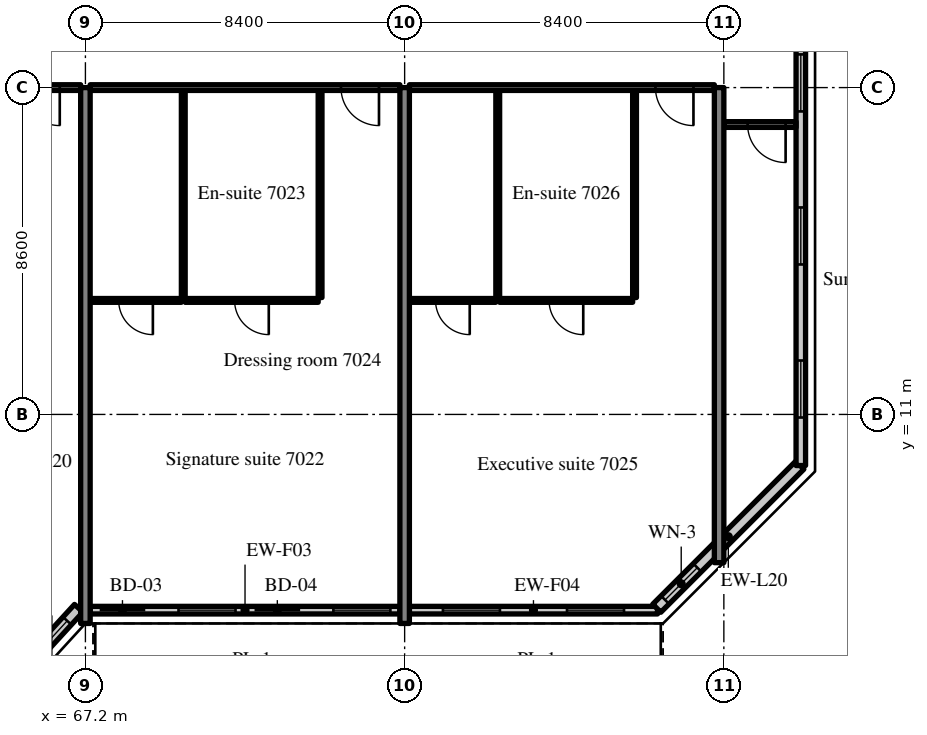
"""IFC4 building model, lengths in metres.
Left out: names, types, materials, properties, quantities, classifications, styles, units other than length and angle.
Written with IfcOpenShell. Run it as: python <this file> out.ifc"""

import sys

from ifc_helpers import new_model, si_unit, direction, frame, frame_2d, origin, place, context, subcontext, project, spatial, rectangle, extrude, source, transform, mapped, element, fill, save


model = new_model("IFC4")
c1 = context("Model", 3, precision=1e-05, world=origin(), true_north=direction((0.0, 1.0)))
c2 = subcontext(c1, "Body", "Model", "MODEL_VIEW")
j1 = project(units=[si_unit("LENGTHUNIT", "METRE"), si_unit("PLANEANGLEUNIT", "RADIAN")], contexts=[c1])
p1 = place(None, origin())
s1 = spatial("IfcSite", under=j1, at=p1, CompositionType="ELEMENT")
p2 = place(p1, origin())
s2 = spatial("IfcBuilding", under=s1, at=p2, CompositionType="ELEMENT")
p3 = place(p2, frame((0.0, 0.0, 293.7)))
s3 = spatial("IfcBuildingStorey", under=s2, at=p3, CompositionType="ELEMENT", Elevation=293.7)
m1 = source(origin(), c2, "Body", "SweptSolid", [
    extrude(rectangle(XDim=14.1, YDim=0.25, at=frame_2d((7.05, 0.0))), origin(), (0.0, 0.0, 1.0), 3.72),
])
for number, where, z_axis, x_axis in (
    (1, (67.2, 5.5, 0.0), (0.0, 0.0, 1.0), (0.0, 1.0, 0.0)),
    (2, (75.6, 5.5, 0.0), (0.0, 0.0, 1.0), (0.0, 1.0, 0.0)),
):
    element("IfcWall", number, at=place(p3, frame(where, z_axis=z_axis, x_axis=x_axis)), inside=s3, PredefinedType="SHEAR", context=c2, shape_type="MappedRepresentation", body=[
        mapped(m1, transform((0.0, 0.0, 0.0), scale=1.0)),
    ])
m2 = source(origin(), c2, "Body", "SweptSolid", [
    extrude(rectangle(XDim=12.5, YDim=0.25, at=frame_2d((6.25, 0.0))), origin(), (0.0, 0.0, 1.0), 3.72),
])
p4 = place(p3, frame((83.875, 7.1, 0.0), z_axis=(0.0, 0.0, 1.0), x_axis=(0.0, 1.0, 0.0)))
e3 = element("IfcWall", 3, at=p4, inside=s3, PredefinedType="SHEAR", context=c2, shape_type="MappedRepresentation", body=[
    mapped(m2, transform((0.0, 0.0, 0.0), scale=1.0)),
])
m3 = source(origin(), c2, "Body", "SweptSolid", [
    extrude(rectangle(XDim=2.398, YDim=0.3, at=frame_2d((1.199, 0.0))), origin(), (0.0, 0.0, 1.0), 3.72),
])
p5 = place(p3, frame((65.404, 4.131, 0.0), z_axis=(0.0, 0.0, 1.0), x_axis=(0.675374189419, 0.737475222815, 0.0)))
e4 = element("IfcWall", 4, at=p5, inside=s3, PredefinedType="SOLIDWALL", context=c2, shape_type="MappedRepresentation", body=[
    mapped(m3, transform((0.0, 0.0, 0.0), scale=1.0)),
])
m4 = source(origin(), c2, "Body", "SweptSolid", [
    extrude(rectangle(XDim=1.5, YDim=2.0, at=frame_2d((0.75, 1.0))), frame((0.0, 0.16, 0.0), z_axis=(0.0, -1.0, 0.0), x_axis=(1.0, 0.0, 0.0)), (0.0, 0.0, 1.0), 0.32),
])
p6 = place(p5, frame((0.449, 0.0, 0.9)))
e5 = element("IfcOpeningElement", 5, at=p6, cuts=e4, PredefinedType="OPENING", context=c2, shape_type="MappedRepresentation", body=[
    mapped(m4, transform((0.0, 0.0, 0.0), scale=1.0)),
])
m5 = source(origin(), c2, "Body", "SweptSolid", [
    extrude(rectangle(XDim=8.15, YDim=0.2, at=frame_2d((4.075, 0.0))), origin(), (0.0, 0.0, 1.0), 3.17),
])
p7 = place(p3, frame((67.325, 5.85, 0.0), z_axis=(0.0, 0.0, 1.0), x_axis=(1.0, 0.0, 0.0)))
e6 = element("IfcWall", 6, at=p7, inside=s3, PredefinedType="SOLIDWALL", context=c2, shape_type="MappedRepresentation", body=[
    mapped(m5, transform((0.0, 0.0, 0.0), scale=1.0)),
])
m6 = source(origin(), c2, "Body", "SweptSolid", [
    extrude(rectangle(XDim=1.2, YDim=2.4, at=frame_2d((0.6, 1.2))), frame((0.0, 0.11, 0.0), z_axis=(0.0, -1.0, 0.0), x_axis=(1.0, 0.0, 0.0)), (0.0, 0.0, 1.0), 0.22),
])
p8 = place(p7, frame((0.25, 0.0, 0.0)))
e7 = element("IfcOpeningElement", 7, at=p8, cuts=e6, PredefinedType="OPENING", context=c2, shape_type="MappedRepresentation", body=[
    mapped(m6, transform((0.0, 0.0, 0.0), scale=1.0)),
])
m7 = source(origin(), c2, "Body", "SweptSolid", [
    extrude(rectangle(XDim=1.5, YDim=1.5, at=frame_2d((0.75, 0.75))), frame((0.0, 0.11, 0.0), z_axis=(0.0, -1.0, 0.0), x_axis=(1.0, 0.0, 0.0)), (0.0, 0.0, 1.0), 0.22),
])
p9 = place(p7, frame((2.325, 0.0, 0.9)))
e8 = element("IfcOpeningElement", 8, at=p9, cuts=e6, PredefinedType="OPENING", context=c2, shape_type="MappedRepresentation", body=[
    mapped(m7, transform((0.0, 0.0, 0.0), scale=1.0)),
])
p10 = place(p7, frame((4.325, 0.0, 0.0)))
e9 = element("IfcOpeningElement", 9, at=p10, cuts=e6, PredefinedType="OPENING", context=c2, shape_type="MappedRepresentation", body=[
    mapped(m6, transform((0.0, 0.0, 0.0), scale=1.0)),
])
p11 = place(p7, frame((6.4, 0.0, 0.9)))
e10 = element("IfcOpeningElement", 10, at=p11, cuts=e6, PredefinedType="OPENING", context=c2, shape_type="MappedRepresentation", body=[
    mapped(m7, transform((0.0, 0.0, 0.0), scale=1.0)),
])
m8 = source(origin(), c2, "Body", "SweptSolid", [
    extrude(rectangle(XDim=6.53, YDim=0.2, at=frame_2d((3.265, 0.0))), origin(), (0.0, 0.0, 1.0), 3.17),
])
p12 = place(p3, frame((75.725, 5.85, 0.0), z_axis=(0.0, 0.0, 1.0), x_axis=(1.0, 0.0, 0.0)))
e11 = element("IfcWall", 11, at=p12, inside=s3, PredefinedType="SOLIDWALL", context=c2, shape_type="MappedRepresentation", body=[
    mapped(m8, transform((0.0, 0.0, 0.0), scale=1.0)),
])
p13 = place(p12, frame((0.883, 0.0, 0.9)))
e12 = element("IfcOpeningElement", 12, at=p13, cuts=e11, PredefinedType="OPENING", context=c2, shape_type="MappedRepresentation", body=[
    mapped(m7, transform((0.0, 0.0, 0.0), scale=1.0)),
])
p14 = place(p12, frame((4.147, 0.0, 0.9)))
e13 = element("IfcOpeningElement", 13, at=p14, cuts=e11, PredefinedType="OPENING", context=c2, shape_type="MappedRepresentation", body=[
    mapped(m7, transform((0.0, 0.0, 0.0), scale=1.0)),
])
m9 = source(origin(), c2, "Body", "SweptSolid", [
    extrude(rectangle(XDim=5.326, YDim=0.3, at=frame_2d((2.663, 0.0))), origin(), (0.0, 0.0, 1.0), 3.72),
])
p15 = place(p3, frame((82.234, 5.9, 0.0), z_axis=(0.0, 0.0, 1.0), x_axis=(0.707083859269, 0.707129702361, 0.0)))
e14 = element("IfcWall", 14, at=p15, inside=s3, PredefinedType="SOLIDWALL", context=c2, shape_type="MappedRepresentation", body=[
    mapped(m9, transform((0.0, 0.0, 0.0), scale=1.0)),
])
m10 = source(origin(), c2, "Body", "SweptSolid", [
    extrude(rectangle(XDim=1.2, YDim=1.5, at=frame_2d((0.6, 0.75))), frame((0.0, 0.16, 0.0), z_axis=(0.0, -1.0, 0.0), x_axis=(1.0, 0.0, 0.0)), (0.0, 0.0, 1.0), 0.32),
])
p16 = place(p15, frame((0.31, 0.0, 0.9)))
e15 = element("IfcOpeningElement", 15, at=p16, cuts=e14, PredefinedType="OPENING", context=c2, shape_type="MappedRepresentation", body=[
    mapped(m10, transform((0.0, 0.0, 0.0), scale=1.0)),
])
m11 = source(origin(), c2, "Body", "SweptSolid", [
    extrude(rectangle(XDim=28.189, YDim=0.25, at=frame_2d((14.095, 0.0))), origin(), (0.0, 0.0, 1.0), 3.72),
])
p17 = place(p3, frame((86.025, 9.655, 0.0), z_axis=(0.0, 0.0, 1.0), x_axis=(0.0, 1.0, 0.0)))
e16 = element("IfcWall", 16, at=p17, inside=s3, PredefinedType="SOLIDWALL", context=c2, shape_type="MappedRepresentation", body=[
    mapped(m11, transform((0.0, 0.0, 0.0), scale=1.0)),
])
m12 = source(origin(), c2, "Body", "SweptSolid", [
    extrude(rectangle(XDim=1.5, YDim=1.5, at=frame_2d((0.75, 0.75))), frame((0.0, 0.135, 0.0), z_axis=(0.0, -1.0, 0.0), x_axis=(1.0, 0.0, 0.0)), (0.0, 0.0, 1.0), 0.27),
])
p18 = place(p17, frame((1.263, 0.0, 0.9)))
e17 = element("IfcOpeningElement", 17, at=p18, cuts=e16, PredefinedType="OPENING", context=c2, shape_type="MappedRepresentation", body=[
    mapped(m12, transform((0.0, 0.0, 0.0), scale=1.0)),
])
p19 = place(p17, frame((5.291, 0.0, 0.9)))
e18 = element("IfcOpeningElement", 18, at=p19, cuts=e16, PredefinedType="OPENING", context=c2, shape_type="MappedRepresentation", body=[
    mapped(m12, transform((0.0, 0.0, 0.0), scale=1.0)),
])
p20 = place(p17, frame((9.318, 0.0, 0.9)))
e19 = element("IfcOpeningElement", 19, at=p20, cuts=e16, PredefinedType="OPENING", context=c2, shape_type="MappedRepresentation", body=[
    mapped(m12, transform((0.0, 0.0, 0.0), scale=1.0)),
])
p21 = place(p17, frame((13.345, 0.0, 0.9)))
e20 = element("IfcOpeningElement", 20, at=p21, cuts=e16, PredefinedType="OPENING", context=c2, shape_type="MappedRepresentation", body=[
    mapped(m12, transform((0.0, 0.0, 0.0), scale=1.0)),
])
p22 = place(p17, frame((17.372, 0.0, 0.9)))
e21 = element("IfcOpeningElement", 21, at=p22, cuts=e16, PredefinedType="OPENING", context=c2, shape_type="MappedRepresentation", body=[
    mapped(m12, transform((0.0, 0.0, 0.0), scale=1.0)),
])
p23 = place(p17, frame((21.399, 0.0, 0.9)))
e22 = element("IfcOpeningElement", 22, at=p23, cuts=e16, PredefinedType="OPENING", context=c2, shape_type="MappedRepresentation", body=[
    mapped(m12, transform((0.0, 0.0, 0.0), scale=1.0)),
])
p24 = place(p17, frame((25.426, 0.0, 0.9)))
e23 = element("IfcOpeningElement", 23, at=p24, cuts=e16, PredefinedType="OPENING", context=c2, shape_type="MappedRepresentation", body=[
    mapped(m12, transform((0.0, 0.0, 0.0), scale=1.0)),
])
m13 = source(origin(), c2, "Body", "SweptSolid", [
    extrude(rectangle(XDim=4.0, YDim=0.15, at=frame_2d((2.0, 0.0))), origin(), (0.0, 0.0, 1.0), 3.02),
])
p25 = place(p3, frame((63.075, 19.6, 0.0), z_axis=(0.0, 0.0, 1.0), x_axis=(1.0, 0.0, 0.0)))
e24 = element("IfcWall", 24, at=p25, inside=s3, PredefinedType="PARTITIONING", context=c2, shape_type="MappedRepresentation", body=[
    mapped(m13, transform((0.0, 0.0, 0.0), scale=1.0)),
])
m14 = source(origin(), c2, "Body", "SweptSolid", [
    extrude(rectangle(XDim=1.0, YDim=2.1, at=frame_2d((0.5, 1.05))), frame((0.0, 0.085, 0.0), z_axis=(0.0, -1.0, 0.0), x_axis=(1.0, 0.0, 0.0)), (0.0, 0.0, 1.0), 0.17),
])
p26 = place(p25, frame((2.45, 0.0, 0.0)))
e25 = element("IfcOpeningElement", 25, at=p26, cuts=e24, PredefinedType="OPENING", context=c2, shape_type="MappedRepresentation", body=[
    mapped(m14, transform((0.0, 0.0, 0.0), scale=1.0)),
])
m15 = source(origin(), c2, "Body", "SweptSolid", [
    extrude(rectangle(XDim=5.45, YDim=0.1, at=frame_2d((2.725, 0.0))), origin(), (0.0, 0.0, 1.0), 3.72),
])
for number, where, z_axis, x_axis in (
    (26, (73.375, 14.075, 0.0), (0.0, 0.0, 1.0), (0.0, 1.0, 0.0)),
    (27, (69.775, 14.075, 0.0), (0.0, 0.0, 1.0), (0.0, 1.0, 0.0)),
):
    element("IfcWall", number, at=place(p3, frame(where, z_axis=z_axis, x_axis=x_axis)), inside=s3, PredefinedType="PARTITIONING", context=c2, shape_type="MappedRepresentation", body=[
        mapped(m15, transform((0.0, 0.0, 0.0), scale=1.0)),
    ])
m16 = source(origin(), c2, "Body", "SweptSolid", [
    extrude(rectangle(XDim=3.5, YDim=0.1, at=frame_2d((1.75, 0.0))), origin(), (0.0, 0.0, 1.0), 3.72),
])
p27 = place(p3, frame((69.825, 14.0, 0.0), z_axis=(0.0, 0.0, 1.0), x_axis=(1.0, 0.0, 0.0)))
e28 = element("IfcWall", 28, at=p27, inside=s3, PredefinedType="PARTITIONING", context=c2, shape_type="MappedRepresentation", body=[
    mapped(m16, transform((0.0, 0.0, 0.0), scale=1.0)),
])
m17 = source(origin(), c2, "Body", "SweptSolid", [
    extrude(rectangle(XDim=0.9, YDim=2.1, at=frame_2d((0.45, 1.05))), frame((0.0, 0.06, 0.0), z_axis=(0.0, -1.0, 0.0), x_axis=(1.0, 0.0, 0.0)), (0.0, 0.0, 1.0), 0.12),
])
p28 = place(p27, frame((1.3, 0.0, 0.0)))
e29 = element("IfcOpeningElement", 29, at=p28, cuts=e28, PredefinedType="OPENING", context=c2, shape_type="MappedRepresentation", body=[
    mapped(m17, transform((0.0, 0.0, 0.0), scale=1.0)),
])
m18 = source(origin(), c2, "Body", "SweptSolid", [
    extrude(rectangle(XDim=2.4, YDim=0.1, at=frame_2d((1.2, 0.0))), origin(), (0.0, 0.0, 1.0), 3.72),
])
p29 = place(p3, frame((67.325, 14.0, 0.0), z_axis=(0.0, 0.0, 1.0), x_axis=(1.0, 0.0, 0.0)))
e30 = element("IfcWall", 30, at=p29, inside=s3, PredefinedType="PARTITIONING", context=c2, shape_type="MappedRepresentation", body=[
    mapped(m18, transform((0.0, 0.0, 0.0), scale=1.0)),
])
p30 = place(p29, frame((0.75, 0.0, 0.0)))
e31 = element("IfcOpeningElement", 31, at=p30, cuts=e30, PredefinedType="OPENING", context=c2, shape_type="MappedRepresentation", body=[
    mapped(m17, transform((0.0, 0.0, 0.0), scale=1.0)),
])
m19 = source(origin(), c2, "Body", "SweptSolid", [
    extrude(rectangle(XDim=8.15, YDim=0.15, at=frame_2d((4.075, 0.0))), origin(), (0.0, 0.0, 1.0), 3.02),
])
p31 = place(p3, frame((67.325, 19.6, 0.0), z_axis=(0.0, 0.0, 1.0), x_axis=(1.0, 0.0, 0.0)))
e32 = element("IfcWall", 32, at=p31, inside=s3, PredefinedType="PARTITIONING", context=c2, shape_type="MappedRepresentation", body=[
    mapped(m19, transform((0.0, 0.0, 0.0), scale=1.0)),
])
p32 = place(p31, frame((6.6, 0.0, 0.0)))
e33 = element("IfcOpeningElement", 33, at=p32, cuts=e32, PredefinedType="OPENING", context=c2, shape_type="MappedRepresentation", body=[
    mapped(m14, transform((0.0, 0.0, 0.0), scale=1.0)),
])
for number, where, z_axis, x_axis in (
    (34, (81.65, 14.075, 0.0), (0.0, 0.0, 1.0), (0.0, 1.0, 0.0)),
    (35, (78.05, 14.075, 0.0), (0.0, 0.0, 1.0), (0.0, 1.0, 0.0)),
):
    element("IfcWall", number, at=place(p3, frame(where, z_axis=z_axis, x_axis=x_axis)), inside=s3, PredefinedType="PARTITIONING", context=c2, shape_type="MappedRepresentation", body=[
        mapped(m15, transform((0.0, 0.0, 0.0), scale=1.0)),
    ])
p33 = place(p3, frame((78.1, 14.0, 0.0), z_axis=(0.0, 0.0, 1.0), x_axis=(1.0, 0.0, 0.0)))
e36 = element("IfcWall", 36, at=p33, inside=s3, PredefinedType="PARTITIONING", context=c2, shape_type="MappedRepresentation", body=[
    mapped(m16, transform((0.0, 0.0, 0.0), scale=1.0)),
])
p34 = place(p33, frame((1.3, 0.0, 0.0)))
e37 = element("IfcOpeningElement", 37, at=p34, cuts=e36, PredefinedType="OPENING", context=c2, shape_type="MappedRepresentation", body=[
    mapped(m17, transform((0.0, 0.0, 0.0), scale=1.0)),
])
m20 = source(origin(), c2, "Body", "SweptSolid", [
    extrude(rectangle(XDim=2.275, YDim=0.1, at=frame_2d((1.137, 0.0))), origin(), (0.0, 0.0, 1.0), 3.72),
])
p35 = place(p3, frame((75.725, 14.0, 0.0), z_axis=(0.0, 0.0, 1.0), x_axis=(1.0, 0.0, 0.0)))
e38 = element("IfcWall", 38, at=p35, inside=s3, PredefinedType="PARTITIONING", context=c2, shape_type="MappedRepresentation", body=[
    mapped(m20, transform((0.0, 0.0, 0.0), scale=1.0)),
])
p36 = place(p35, frame((0.688, 0.0, 0.0)))
e39 = element("IfcOpeningElement", 39, at=p36, cuts=e38, PredefinedType="OPENING", context=c2, shape_type="MappedRepresentation", body=[
    mapped(m17, transform((0.0, 0.0, 0.0), scale=1.0)),
])
m21 = source(origin(), c2, "Body", "SweptSolid", [
    extrude(rectangle(XDim=8.025, YDim=0.15, at=frame_2d((4.012, 0.0))), origin(), (0.0, 0.0, 1.0), 3.02),
])
p37 = place(p3, frame((75.725, 19.6, 0.0), z_axis=(0.0, 0.0, 1.0), x_axis=(1.0, 0.0, 0.0)))
e40 = element("IfcWall", 40, at=p37, inside=s3, PredefinedType="PARTITIONING", context=c2, shape_type="MappedRepresentation", body=[
    mapped(m21, transform((0.0, 0.0, 0.0), scale=1.0)),
])
p38 = place(p37, frame((6.475, 0.0, 0.0)))
e41 = element("IfcOpeningElement", 41, at=p38, cuts=e40, PredefinedType="OPENING", context=c2, shape_type="MappedRepresentation", body=[
    mapped(m14, transform((0.0, 0.0, 0.0), scale=1.0)),
])
m22 = source(origin(), c2, "Body", "SweptSolid", [
    extrude(rectangle(XDim=1.9, YDim=0.15, at=frame_2d((0.95, 0.0))), origin(), (0.0, 0.0, 1.0), 3.02),
])
p39 = place(p3, frame((84.0, 18.628, 0.0), z_axis=(0.0, 0.0, 1.0), x_axis=(1.0, 0.0, 0.0)))
e42 = element("IfcWall", 42, at=p39, inside=s3, PredefinedType="PARTITIONING", context=c2, shape_type="MappedRepresentation", body=[
    mapped(m22, transform((0.0, 0.0, 0.0), scale=1.0)),
])
p40 = place(p39, frame((0.625, 0.0, 0.0)))
e43 = element("IfcOpeningElement", 43, at=p40, cuts=e42, PredefinedType="OPENING", context=c2, shape_type="MappedRepresentation", body=[
    mapped(m14, transform((0.0, 0.0, 0.0), scale=1.0)),
])
m23 = source(origin(), c2, "Body", "SweptSolid", [
    extrude(rectangle(XDim=1.5, YDim=2.0, at=frame_2d((0.75, 1.0))), frame((0.0, 0.03, 0.0), z_axis=(0.0, -1.0, 0.0), x_axis=(1.0, 0.0, 0.0)), (0.0, 0.0, 1.0), 0.06),
])
p41 = place(p6, origin())
e44 = element("IfcWindow", 44, at=p41, inside=s3, PartitioningType="SINGLE_PANEL", PredefinedType="WINDOW", context=c2, shape_type="MappedRepresentation", body=[
    mapped(m23, transform((0.0, 0.0, 0.0), scale=1.0)),
])
fill(e5, e44)
m24 = source(origin(), c2, "Body", "SweptSolid", [
    extrude(rectangle(XDim=1.2, YDim=2.4, at=frame_2d((0.6, 1.2))), frame((0.0, 0.025, 0.0), z_axis=(0.0, -1.0, 0.0), x_axis=(1.0, 0.0, 0.0)), (0.0, 0.0, 1.0), 0.05),
])
p42 = place(p8, origin())
e45 = element("IfcDoor", 45, at=p42, inside=s3, OperationType="SLIDING_TO_LEFT", PredefinedType="DOOR", context=c2, shape_type="MappedRepresentation", body=[
    mapped(m24, transform((0.0, 0.0, 0.0), scale=1.0)),
])
fill(e7, e45)
m25 = source(origin(), c2, "Body", "SweptSolid", [
    extrude(rectangle(XDim=1.5, YDim=1.5, at=frame_2d((0.75, 0.75))), frame((0.0, 0.03, 0.0), z_axis=(0.0, -1.0, 0.0), x_axis=(1.0, 0.0, 0.0)), (0.0, 0.0, 1.0), 0.06),
])
p43 = place(p9, origin())
e46 = element("IfcWindow", 46, at=p43, inside=s3, PartitioningType="SINGLE_PANEL", PredefinedType="WINDOW", context=c2, shape_type="MappedRepresentation", body=[
    mapped(m25, transform((0.0, 0.0, 0.0), scale=1.0)),
])
fill(e8, e46)
p44 = place(p10, origin())
e47 = element("IfcDoor", 47, at=p44, inside=s3, OperationType="SLIDING_TO_RIGHT", PredefinedType="DOOR", context=c2, shape_type="MappedRepresentation", body=[
    mapped(m24, transform((0.0, 0.0, 0.0), scale=1.0)),
])
fill(e9, e47)
p45 = place(p11, origin())
e48 = element("IfcWindow", 48, at=p45, inside=s3, PartitioningType="SINGLE_PANEL", PredefinedType="WINDOW", context=c2, shape_type="MappedRepresentation", body=[
    mapped(m25, transform((0.0, 0.0, 0.0), scale=1.0)),
])
fill(e10, e48)
p46 = place(p13, origin())
e49 = element("IfcWindow", 49, at=p46, inside=s3, PartitioningType="SINGLE_PANEL", PredefinedType="WINDOW", context=c2, shape_type="MappedRepresentation", body=[
    mapped(m25, transform((0.0, 0.0, 0.0), scale=1.0)),
])
fill(e12, e49)
p47 = place(p14, origin())
e50 = element("IfcWindow", 50, at=p47, inside=s3, PartitioningType="SINGLE_PANEL", PredefinedType="WINDOW", context=c2, shape_type="MappedRepresentation", body=[
    mapped(m25, transform((0.0, 0.0, 0.0), scale=1.0)),
])
fill(e13, e50)
m26 = source(origin(), c2, "Body", "SweptSolid", [
    extrude(rectangle(XDim=1.2, YDim=1.5, at=frame_2d((0.6, 0.75))), frame((0.0, 0.03, 0.0), z_axis=(0.0, -1.0, 0.0), x_axis=(1.0, 0.0, 0.0)), (0.0, 0.0, 1.0), 0.06),
])
p48 = place(p16, origin())
e51 = element("IfcWindow", 51, at=p48, inside=s3, PartitioningType="SINGLE_PANEL", PredefinedType="WINDOW", context=c2, shape_type="MappedRepresentation", body=[
    mapped(m26, transform((0.0, 0.0, 0.0), scale=1.0)),
])
fill(e15, e51)
p49 = place(p18, origin())
e52 = element("IfcWindow", 52, at=p49, inside=s3, PartitioningType="SINGLE_PANEL", PredefinedType="WINDOW", context=c2, shape_type="MappedRepresentation", body=[
    mapped(m25, transform((0.0, 0.0, 0.0), scale=1.0)),
])
fill(e17, e52)
p50 = place(p19, origin())
e53 = element("IfcWindow", 53, at=p50, inside=s3, PartitioningType="SINGLE_PANEL", PredefinedType="WINDOW", context=c2, shape_type="MappedRepresentation", body=[
    mapped(m25, transform((0.0, 0.0, 0.0), scale=1.0)),
])
fill(e18, e53)
p51 = place(p20, origin())
e54 = element("IfcWindow", 54, at=p51, inside=s3, PartitioningType="SINGLE_PANEL", PredefinedType="WINDOW", context=c2, shape_type="MappedRepresentation", body=[
    mapped(m25, transform((0.0, 0.0, 0.0), scale=1.0)),
])
fill(e19, e54)
m27 = source(origin(), c2, "Body", "SweptSolid", [
    extrude(rectangle(XDim=1.0, YDim=2.1, at=frame_2d((0.5, 1.05))), frame((0.0, 0.025, 0.0), z_axis=(0.0, -1.0, 0.0), x_axis=(1.0, 0.0, 0.0)), (0.0, 0.0, 1.0), 0.05),
])
p52 = place(p26, origin())
e55 = element("IfcDoor", 55, at=p52, inside=s3, OperationType="SINGLE_SWING_RIGHT", PredefinedType="DOOR", context=c2, shape_type="MappedRepresentation", body=[
    mapped(m27, transform((0.0, 0.0, 0.0), scale=1.0)),
])
fill(e25, e55)
m28 = source(origin(), c2, "Body", "SweptSolid", [
    extrude(rectangle(XDim=0.9, YDim=2.1, at=frame_2d((0.45, 1.05))), frame((0.0, 0.025, 0.0), z_axis=(0.0, -1.0, 0.0), x_axis=(1.0, 0.0, 0.0)), (0.0, 0.0, 1.0), 0.05),
])
p53 = place(p28, origin())
e56 = element("IfcDoor", 56, at=p53, inside=s3, OperationType="SINGLE_SWING_RIGHT", PredefinedType="DOOR", context=c2, shape_type="MappedRepresentation", body=[
    mapped(m28, transform((0.0, 0.0, 0.0), scale=1.0)),
])
fill(e29, e56)
p54 = place(p30, origin())
e57 = element("IfcDoor", 57, at=p54, inside=s3, OperationType="SINGLE_SWING_RIGHT", PredefinedType="DOOR", context=c2, shape_type="MappedRepresentation", body=[
    mapped(m28, transform((0.0, 0.0, 0.0), scale=1.0)),
])
fill(e31, e57)
p55 = place(p32, origin())
e58 = element("IfcDoor", 58, at=p55, inside=s3, OperationType="SINGLE_SWING_RIGHT", PredefinedType="DOOR", context=c2, shape_type="MappedRepresentation", body=[
    mapped(m27, transform((0.0, 0.0, 0.0), scale=1.0)),
])
fill(e33, e58)
p56 = place(p34, origin())
e59 = element("IfcDoor", 59, at=p56, inside=s3, OperationType="SINGLE_SWING_RIGHT", PredefinedType="DOOR", context=c2, shape_type="MappedRepresentation", body=[
    mapped(m28, transform((0.0, 0.0, 0.0), scale=1.0)),
])
fill(e37, e59)
p57 = place(p36, origin())
e60 = element("IfcDoor", 60, at=p57, inside=s3, OperationType="SINGLE_SWING_RIGHT", PredefinedType="DOOR", context=c2, shape_type="MappedRepresentation", body=[
    mapped(m28, transform((0.0, 0.0, 0.0), scale=1.0)),
])
fill(e39, e60)
p58 = place(p38, origin())
e61 = element("IfcDoor", 61, at=p58, inside=s3, OperationType="SINGLE_SWING_RIGHT", PredefinedType="DOOR", context=c2, shape_type="MappedRepresentation", body=[
    mapped(m27, transform((0.0, 0.0, 0.0), scale=1.0)),
])
fill(e41, e61)
p59 = place(p40, origin())
e62 = element("IfcDoor", 62, at=p59, inside=s3, OperationType="SINGLE_SWING_RIGHT", PredefinedType="DOOR", context=c2, shape_type="MappedRepresentation", body=[
    mapped(m27, transform((0.0, 0.0, 0.0), scale=1.0)),
])
fill(e43, e62)
save(model, sys.argv[1])
